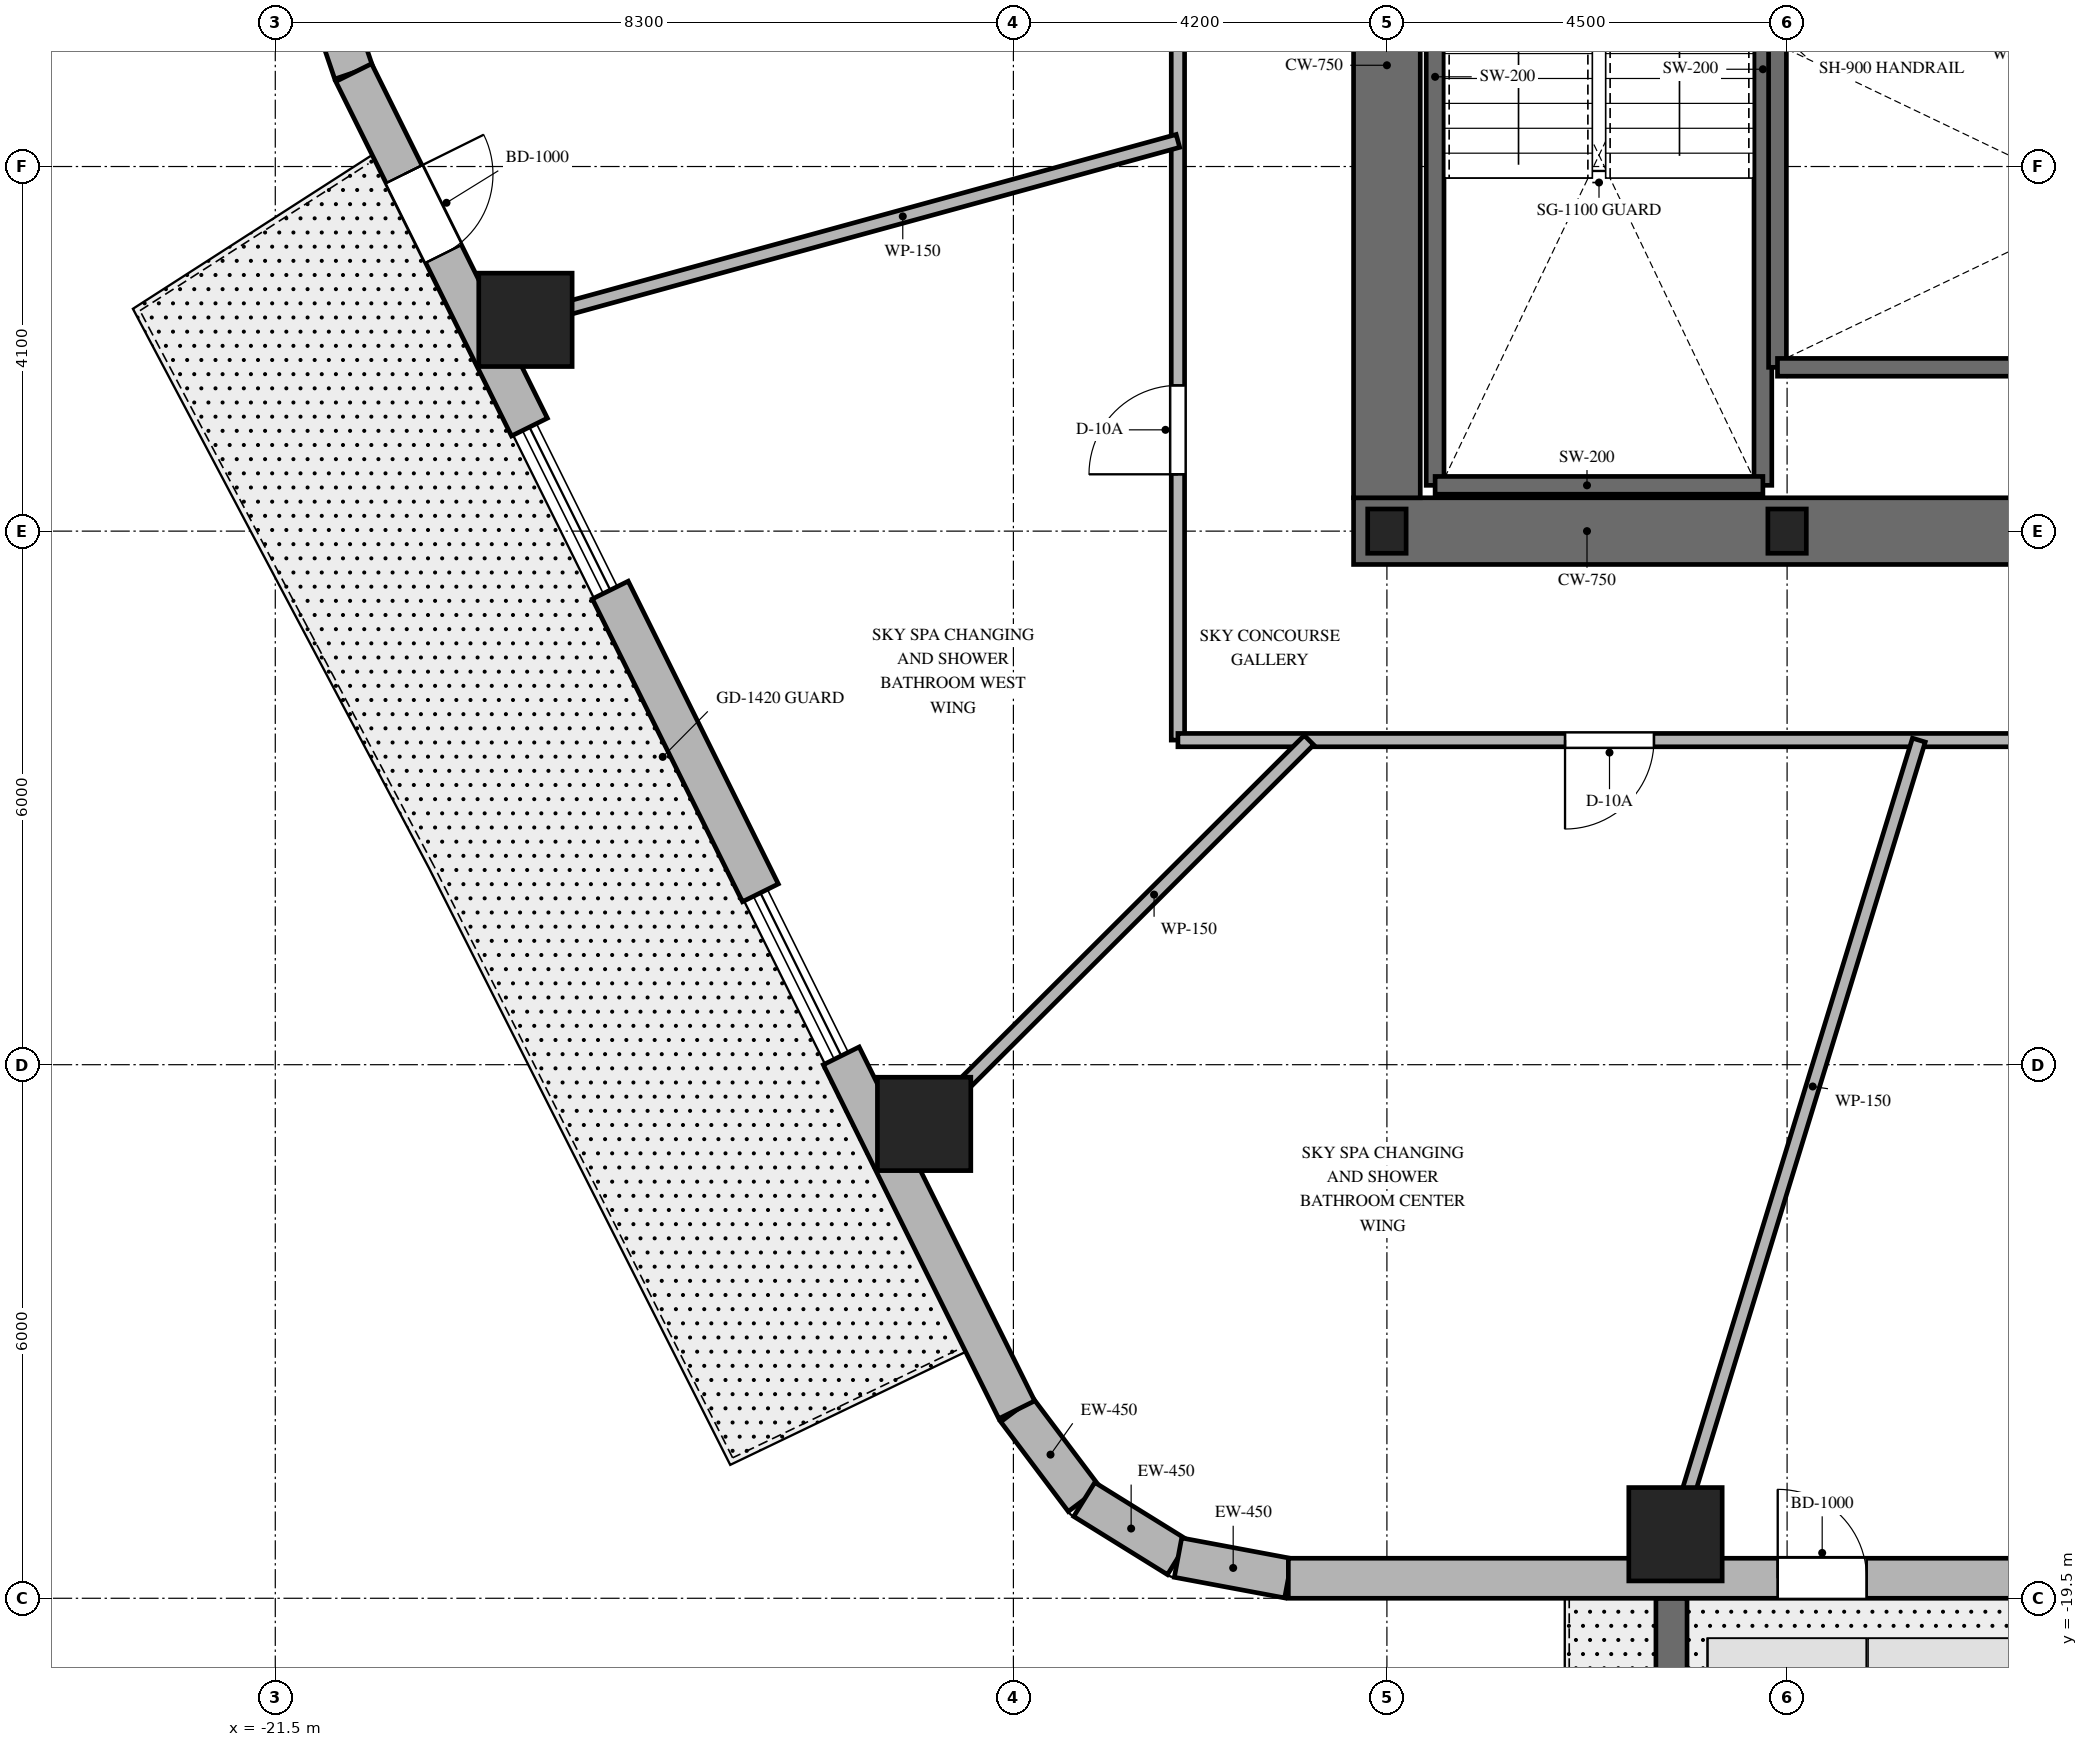
"""IFC4 building model, lengths in metres.
Left out: names, types, materials, properties, quantities, classifications, styles, units other than length and angle.
Written with IfcOpenShell. Run it as: python <this file> out.ifc"""

import sys

from ifc_helpers import new_model, si_unit, direction, frame, frame_2d, origin, origin_2d, place, context, subcontext, project, spatial, rectangle, i_section, extrude, element, fill, save


model = new_model("IFC4")
c1 = context("Model", 3, precision=1e-05, world=origin(), true_north=direction((0.0, 1.0)))
c2 = subcontext(c1, "Body", "Model", "MODEL_VIEW")
j1 = project(units=[si_unit("LENGTHUNIT", "METRE"), si_unit("PLANEANGLEUNIT", "RADIAN")], contexts=[c1])
p1 = place(None, origin())
s1 = spatial("IfcSite", under=j1, at=p1, CompositionType="ELEMENT")
p2 = place(p1, origin())
s2 = spatial("IfcBuilding", under=s1, at=p2, CompositionType="ELEMENT")
p3 = place(p2, frame((0.0, 0.0, 201.5)))
s3 = spatial("IfcBuildingStorey", under=s2, at=p3, CompositionType="ELEMENT", Elevation=201.5)
p4 = place(p3, frame((-9.375, -7.5, 0.0), z_axis=(0.0, 0.0, 1.0), x_axis=(1.0, 0.0, 0.0)))
e1 = element("IfcWall", 1, at=p4, inside=s3, PredefinedType="SHEAR", context=c2, shape_type="SweptSolid", body=[
    extrude(rectangle(XDim=18.75, YDim=0.75, at=frame_2d((9.375, 0.0))), origin(), (0.0, 0.0, 1.0), 5.0),
])
p5 = place(p4, frame((9.425, 0.0, 0.0)))
e2 = element("IfcOpeningElement", 2, at=p5, cuts=e1, PredefinedType="OPENING", context=c2, shape_type="SweptSolid", body=[
    extrude(rectangle(XDim=1.0, YDim=2.15, at=frame_2d((0.5, 1.075))), frame((0.0, 0.385, 0.0), z_axis=(0.0, -1.0, 0.0), x_axis=(1.0, 0.0, 0.0)), (0.0, 0.0, 1.0), 0.77),
])
p6 = place(p3, frame((-9.0, -7.125, 0.0), z_axis=(0.0, 0.0, 1.0), x_axis=(0.0, 1.0, 0.0)))
e3 = element("IfcWall", 3, at=p6, inside=s3, PredefinedType="SHEAR", context=c2, shape_type="SweptSolid", body=[
    extrude(rectangle(XDim=14.25, YDim=0.75, at=frame_2d((7.125, 0.0))), origin(), (0.0, 0.0, 1.0), 5.0),
])
p7 = place(p6, frame((10.25, 0.0, 0.0)))
e4 = element("IfcOpeningElement", 4, at=p7, cuts=e3, PredefinedType="OPENING", context=c2, shape_type="SweptSolid", body=[
    extrude(rectangle(XDim=1.05, YDim=2.15, at=frame_2d((0.525, 1.075))), frame((0.0, 0.385, 0.0), z_axis=(0.0, -1.0, 0.0), x_axis=(1.0, 0.0, 0.0)), (0.0, 0.0, 1.0), 0.77),
])
for number, where, z_axis, x_axis in (
    (5, (-8.458, -6.985, 0.0), (0.0, 0.0, 1.0), (0.0, 1.0, 0.0)),
    (6, (-4.772, -6.985, 0.0), (0.0, 0.0, 1.0), (0.0, 1.0, 0.0)),
):
    element("IfcWall", number, at=place(p3, frame(where, z_axis=z_axis, x_axis=x_axis)), inside=s3, PredefinedType="SHEAR", context=c2, shape_type="SweptSolid", body=[
        extrude(rectangle(XDim=9.143, YDim=0.2, at=frame_2d((4.572, 0.0))), origin(), (0.0, 0.0, 1.0), 5.0),
    ])
for number, where, z_axis, x_axis in (
    (7, (-8.458, -6.985, 0.0), (0.0, 0.0, 1.0), (1.0, 0.0, 0.0)),
    (8, (-4.608, -5.658, 0.0), (0.0, 0.0, 1.0), (0.0, 1.0, 0.0)),
):
    element("IfcWall", number, at=place(p3, frame(where, z_axis=z_axis, x_axis=x_axis)), inside=s3, PredefinedType="SHEAR", context=c2, shape_type="SweptSolid", body=[
        extrude(rectangle(XDim=3.686, YDim=0.2, at=frame_2d((1.843, 0.0))), origin(), (0.0, 0.0, 1.0), 5.0),
    ])
p8 = place(p3, frame((-4.608, -5.658, 0.0), z_axis=(0.0, 0.0, 1.0), x_axis=(1.0, 0.0, 0.0)))
e9 = element("IfcWall", 9, at=p8, inside=s3, PredefinedType="SHEAR", context=c2, shape_type="SweptSolid", body=[
    extrude(rectangle(XDim=9.166, YDim=0.2, at=frame_2d((4.583, 0.0))), origin(), (0.0, 0.0, 1.0), 5.0),
])
p9 = place(p8, frame((7.45, 0.0, 0.0)))
e10 = element("IfcOpeningElement", 10, at=p9, cuts=e9, PredefinedType="OPENING", context=c2, shape_type="SweptSolid", body=[
    extrude(rectangle(XDim=1.0, YDim=2.15, at=frame_2d((0.5, 1.075))), frame((0.0, 0.11, 0.0), z_axis=(0.0, -1.0, 0.0), x_axis=(1.0, 0.0, 0.0)), (0.0, 0.0, 1.0), 0.22),
])
for number, where, z_axis, x_axis in (
    (11, (-9.0, -7.5, 0.0), (0.0, 0.0, 1.0), (1.0, 0.0, 0.0)),
    (12, (-4.5, -7.5, 0.0), (0.0, 0.0, 1.0), (1.0, 0.0, 0.0)),
):
    element("IfcColumn", number, at=place(p3, frame(where, z_axis=z_axis, x_axis=x_axis)), inside=s3, PredefinedType="COLUMN", context=c2, shape_type="SweptSolid", body=[
        extrude(i_section(OverallWidth=0.432, OverallDepth=0.498, WebThickness=0.056, FlangeThickness=0.089, at=origin_2d()), origin(), (0.0, 0.0, 1.0), 5.0),
    ])
for number, where, z_axis, x_axis in (
    (13, (-5.755, -18.78, 0.0), (0.0, 0.0, 1.0), (1.0, 0.0, 0.0)),
    (14, (-18.687, -5.124, 0.0), (0.0, 0.0, 1.0), (1.0, 0.0, 0.0)),
    (15, (-14.204, -14.166, 0.0), (0.0, 0.0, 1.0), (1.0, 0.0, 0.0)),
):
    element("IfcColumn", number, at=place(p3, frame(where, z_axis=z_axis, x_axis=x_axis)), inside=s3, PredefinedType="COLUMN", context=c2, shape_type="SweptSolid", body=[
        extrude(rectangle(XDim=1.05, YDim=1.05, at=origin_2d()), origin(), (0.0, 0.0, 1.0), 5.0),
    ])
p10 = place(p3, frame((-5.8, -21.93, 0.0), z_axis=(0.0, 0.0, 1.0), x_axis=(0.0, 1.0, 0.0)))
e16 = element("IfcWall", 16, at=p10, inside=s3, PredefinedType="SOLIDWALL", context=c2, shape_type="SweptSolid", body=[
    extrude(rectangle(XDim=2.43, YDim=0.35, at=frame_2d((1.215, 0.0))), origin(), (0.0, 0.0, 1.0), 1.42),
])
p11 = place(p3, frame((-13.162, -17.381, 0.0), z_axis=(0.0, 0.0, 1.0), x_axis=(0.601515770517, -0.798860925205, 0.0)))
e17 = element("IfcWall", 17, at=p11, inside=s3, PredefinedType="SOLIDWALL", context=c2, shape_type="SweptSolid", body=[
    extrude(rectangle(XDim=1.262, YDim=0.45, at=frame_2d((0.631, 0.0))), origin(), (0.0, 0.0, 1.0), 4.7),
])
p12 = place(p3, frame((-12.403, -18.389, 0.0), z_axis=(0.0, 0.0, 1.0), x_axis=(0.849795170926, -0.527113049991, 0.0)))
e18 = element("IfcWall", 18, at=p12, inside=s3, PredefinedType="SOLIDWALL", context=c2, shape_type="SweptSolid", body=[
    extrude(rectangle(XDim=1.241, YDim=0.45, at=frame_2d((0.62, 0.0))), origin(), (0.0, 0.0, 1.0), 4.7),
])
p13 = place(p3, frame((-11.349, -19.043, 0.0), z_axis=(0.0, 0.0, 1.0), x_axis=(0.982931267051, -0.183973161772, 0.0)))
e19 = element("IfcWall", 19, at=p13, inside=s3, PredefinedType="SOLIDWALL", context=c2, shape_type="SweptSolid", body=[
    extrude(rectangle(XDim=1.262, YDim=0.45, at=frame_2d((0.631, 0.0))), origin(), (0.0, 0.0, 1.0), 4.7),
])
p14 = place(p3, frame((-20.911, -1.484, 0.0), z_axis=(0.0, 0.0, 1.0), x_axis=(0.321623334353, -0.946867694453, 0.0)))
e20 = element("IfcWall", 20, at=p14, inside=s3, PredefinedType="SOLIDWALL", context=c2, shape_type="SweptSolid", body=[
    extrude(rectangle(XDim=0.909, YDim=0.45, at=frame_2d((0.454, 0.0))), origin(), (0.0, 0.0, 1.0), 4.7),
])
p15 = place(p3, frame((-10.108, -19.275, 0.0), z_axis=(0.0, 0.0, 1.0), x_axis=(1.0, 0.0, 0.0)))
e21 = element("IfcWall", 21, at=p15, inside=s3, PredefinedType="SOLIDWALL", context=c2, shape_type="SweptSolid", body=[
    extrude(rectangle(XDim=21.829, YDim=0.45, at=frame_2d((10.915, 0.0))), origin(), (0.0, 0.0, 1.0), 4.7),
])
p16 = place(p15, frame((5.503, 0.0, 0.0)))
e22 = element("IfcOpeningElement", 22, at=p16, cuts=e21, PredefinedType="OPENING", context=c2, shape_type="SweptSolid", body=[
    extrude(rectangle(XDim=1.0, YDim=2.15, at=frame_2d((0.5, 1.075))), frame((0.0, 0.235, 0.0), z_axis=(0.0, -1.0, 0.0), x_axis=(1.0, 0.0, 0.0)), (0.0, 0.0, 1.0), 0.47),
])
p17 = place(p15, frame((10.115, 0.0, 0.8)))
e23 = element("IfcOpeningElement", 23, at=p17, cuts=e21, PredefinedType="OPENING", context=c2, shape_type="SweptSolid", body=[
    extrude(rectangle(XDim=1.6, YDim=1.75, at=frame_2d((0.8, 0.875))), frame((0.0, 0.235, 0.0), z_axis=(0.0, -1.0, 0.0), x_axis=(1.0, 0.0, 0.0)), (0.0, 0.0, 1.0), 0.47),
])
p18 = place(p15, frame((18.933, 0.0, 0.8)))
e24 = element("IfcOpeningElement", 24, at=p18, cuts=e21, PredefinedType="OPENING", context=c2, shape_type="SweptSolid", body=[
    extrude(rectangle(XDim=1.6, YDim=1.75, at=frame_2d((0.8, 0.875))), frame((0.0, 0.235, 0.0), z_axis=(0.0, -1.0, 0.0), x_axis=(1.0, 0.0, 0.0)), (0.0, 0.0, 1.0), 0.47),
])
p19 = place(p3, frame((-20.618, -2.344, 0.0), z_axis=(0.0, 0.0, 1.0), x_axis=(0.444248024627, -0.895903841166, 0.0)))
e25 = element("IfcWall", 25, at=p19, inside=s3, PredefinedType="SOLIDWALL", context=c2, shape_type="SweptSolid", body=[
    extrude(rectangle(XDim=4.449, YDim=0.45, at=frame_2d((2.225, 0.0))), origin(), (0.0, 0.0, 1.0), 4.7),
])
p20 = place(p19, frame((1.275, 0.0, 0.0)))
e26 = element("IfcOpeningElement", 26, at=p20, cuts=e25, PredefinedType="OPENING", context=c2, shape_type="SweptSolid", body=[
    extrude(rectangle(XDim=1.0, YDim=2.15, at=frame_2d((0.5, 1.075))), frame((0.0, 0.235, 0.0), z_axis=(0.0, -1.0, 0.0), x_axis=(1.0, 0.0, 0.0)), (0.0, 0.0, 1.0), 0.47),
])
p21 = place(p3, frame((-17.733, -8.163, 0.0), z_axis=(0.0, 0.0, 1.0), x_axis=(0.444229875213, -0.895912840609, 0.0)))
e27 = element("IfcWall", 27, at=p21, inside=s3, PredefinedType="SOLIDWALL", context=c2, shape_type="SweptSolid", body=[
    extrude(rectangle(XDim=3.8, YDim=0.45, at=frame_2d((1.9, 0.0))), origin(), (0.0, 0.0, 1.0), 4.7),
])
p22 = place(p3, frame((-15.136, -13.4, 0.0), z_axis=(0.0, 0.0, 1.0), x_axis=(0.444243648127, -0.895906011308, 0.0)))
e28 = element("IfcWall", 28, at=p22, inside=s3, PredefinedType="SOLIDWALL", context=c2, shape_type="SweptSolid", body=[
    extrude(rectangle(XDim=4.443, YDim=0.45, at=frame_2d((2.221, 0.0))), origin(), (0.0, 0.0, 1.0), 4.7),
])
p23 = place(p3, frame((-11.35, -9.85, 0.0), z_axis=(0.0, 0.0, 1.0), x_axis=(0.0, 1.0, 0.0)))
e29 = element("IfcWall", 29, at=p23, inside=s3, PredefinedType="PARTITIONING", context=c2, shape_type="SweptSolid", body=[
    extrude(rectangle(XDim=19.7, YDim=0.15, at=frame_2d((9.85, 0.0))), origin(), (0.0, 0.0, 1.0), 2.89),
])
p24 = place(p23, frame((15.183, 0.0, 0.0)))
e30 = element("IfcOpeningElement", 30, at=p24, cuts=e29, PredefinedType="OPENING", context=c2, shape_type="SweptSolid", body=[
    extrude(rectangle(XDim=1.0, YDim=2.03, at=frame_2d((0.5, 1.015))), frame((0.0, 0.085, 0.0), z_axis=(0.0, -1.0, 0.0), x_axis=(1.0, 0.0, 0.0)), (0.0, 0.0, 1.0), 0.17),
])
p25 = place(p23, frame((8.819, 0.0, 0.0)))
e31 = element("IfcOpeningElement", 31, at=p25, cuts=e29, PredefinedType="OPENING", context=c2, shape_type="SweptSolid", body=[
    extrude(rectangle(XDim=1.0, YDim=2.03, at=frame_2d((0.5, 1.015))), frame((0.0, 0.085, 0.0), z_axis=(0.0, -1.0, 0.0), x_axis=(1.0, 0.0, 0.0)), (0.0, 0.0, 1.0), 0.17),
])
p26 = place(p23, frame((2.989, 0.0, 0.0)))
e32 = element("IfcOpeningElement", 32, at=p26, cuts=e29, PredefinedType="OPENING", context=c2, shape_type="SweptSolid", body=[
    extrude(rectangle(XDim=1.0, YDim=2.03, at=frame_2d((0.5, 1.015))), frame((0.0, 0.085, 0.0), z_axis=(0.0, -1.0, 0.0), x_axis=(1.0, 0.0, 0.0)), (0.0, 0.0, 1.0), 0.17),
])
p27 = place(p3, frame((11.35, -9.85, 0.0), z_axis=(0.0, 0.0, 1.0), x_axis=(-1.0, 0.0, 0.0)))
e33 = element("IfcWall", 33, at=p27, inside=s3, PredefinedType="PARTITIONING", context=c2, shape_type="SweptSolid", body=[
    extrude(rectangle(XDim=22.7, YDim=0.15, at=frame_2d((11.35, 0.0))), origin(), (0.0, 0.0, 1.0), 2.89),
])
p28 = place(p27, frame((17.347, 0.0, 0.0)))
e34 = element("IfcOpeningElement", 34, at=p28, cuts=e33, PredefinedType="OPENING", context=c2, shape_type="SweptSolid", body=[
    extrude(rectangle(XDim=1.0, YDim=2.03, at=frame_2d((0.5, 1.015))), frame((0.0, 0.085, 0.0), z_axis=(0.0, -1.0, 0.0), x_axis=(1.0, 0.0, 0.0)), (0.0, 0.0, 1.0), 0.17),
])
p29 = place(p27, frame((10.423, 0.0, 0.0)))
e35 = element("IfcOpeningElement", 35, at=p29, cuts=e33, PredefinedType="OPENING", context=c2, shape_type="SweptSolid", body=[
    extrude(rectangle(XDim=1.0, YDim=2.03, at=frame_2d((0.5, 1.015))), frame((0.0, 0.085, 0.0), z_axis=(0.0, -1.0, 0.0), x_axis=(1.0, 0.0, 0.0)), (0.0, 0.0, 1.0), 0.17),
])
p30 = place(p27, frame((3.362, 0.0, 0.0)))
e36 = element("IfcOpeningElement", 36, at=p30, cuts=e33, PredefinedType="OPENING", context=c2, shape_type="SweptSolid", body=[
    extrude(rectangle(XDim=1.0, YDim=2.03, at=frame_2d((0.5, 1.015))), frame((0.0, 0.085, 0.0), z_axis=(0.0, -1.0, 0.0), x_axis=(1.0, 0.0, 0.0)), (0.0, 0.0, 1.0), 0.17),
])
p31 = place(p3, frame((-11.35, -3.112, 0.0), z_axis=(0.0, 0.0, 1.0), x_axis=(-0.964400374182, -0.264446437445, 0.0)))
e37 = element("IfcWall", 37, at=p31, inside=s3, PredefinedType="PARTITIONING", context=c2, shape_type="SweptSolid", body=[
    extrude(rectangle(XDim=8.112, YDim=0.15, at=frame_2d((4.056, 0.0))), origin(), (0.0, 0.0, 1.0), 2.89),
])
p32 = place(p3, frame((-9.876, -9.85, 0.0), z_axis=(0.0, 0.0, 1.0), x_axis=(-0.708044623933, -0.706167692917, 0.0)))
e38 = element("IfcWall", 38, at=p32, inside=s3, PredefinedType="PARTITIONING", context=c2, shape_type="SweptSolid", body=[
    extrude(rectangle(XDim=6.634, YDim=0.15, at=frame_2d((3.317, 0.0))), origin(), (0.0, 0.0, 1.0), 2.89),
])
p33 = place(p3, frame((-3.019, -9.85, 0.0), z_axis=(0.0, 0.0, 1.0), x_axis=(-0.292996168014, -0.956113615387, 0.0)))
e39 = element("IfcWall", 39, at=p33, inside=s3, PredefinedType="PARTITIONING", context=c2, shape_type="SweptSolid", body=[
    extrude(rectangle(XDim=9.857, YDim=0.15, at=frame_2d((4.929, 0.0))), origin(), (0.0, 0.0, 1.0), 2.89),
])
p34 = place(p16, origin())
e40 = element("IfcDoor", 40, at=p34, inside=s3, OperationType="SINGLE_SWING_LEFT", PredefinedType="DOOR", context=c2, shape_type="SweptSolid", body=[
    extrude(rectangle(XDim=1.0, YDim=2.15, at=frame_2d((0.5, 1.075))), frame((0.0, 0.025, 0.0), z_axis=(0.0, -1.0, 0.0), x_axis=(1.0, 0.0, 0.0)), (0.0, 0.0, 1.0), 0.05),
])
fill(e22, e40)
p35 = place(p20, origin())
e41 = element("IfcDoor", 41, at=p35, inside=s3, OperationType="SINGLE_SWING_LEFT", PredefinedType="DOOR", context=c2, shape_type="SweptSolid", body=[
    extrude(rectangle(XDim=1.0, YDim=2.15, at=frame_2d((0.5, 1.075))), frame((0.0, 0.025, 0.0), z_axis=(0.0, -1.0, 0.0), x_axis=(1.0, 0.0, 0.0)), (0.0, 0.0, 1.0), 0.05),
])
fill(e26, e41)
p36 = place(p26, origin())
e42 = element("IfcDoor", 42, at=p36, inside=s3, OperationType="SINGLE_SWING_LEFT", PredefinedType="DOOR", context=c2, shape_type="SweptSolid", body=[
    extrude(rectangle(XDim=1.0, YDim=2.03, at=frame_2d((0.5, 1.015))), frame((0.0, 0.025, 0.0), z_axis=(0.0, -1.0, 0.0), x_axis=(1.0, 0.0, 0.0)), (0.0, 0.0, 1.0), 0.05),
])
fill(e32, e42)
p37 = place(p28, origin())
e43 = element("IfcDoor", 43, at=p37, inside=s3, OperationType="SINGLE_SWING_RIGHT", PredefinedType="DOOR", context=c2, shape_type="SweptSolid", body=[
    extrude(rectangle(XDim=1.0, YDim=2.03, at=frame_2d((0.5, 1.015))), frame((0.0, 0.025, 0.0), z_axis=(0.0, -1.0, 0.0), x_axis=(1.0, 0.0, 0.0)), (0.0, 0.0, 1.0), 0.05),
])
fill(e34, e43)
save(model, sys.argv[1])
